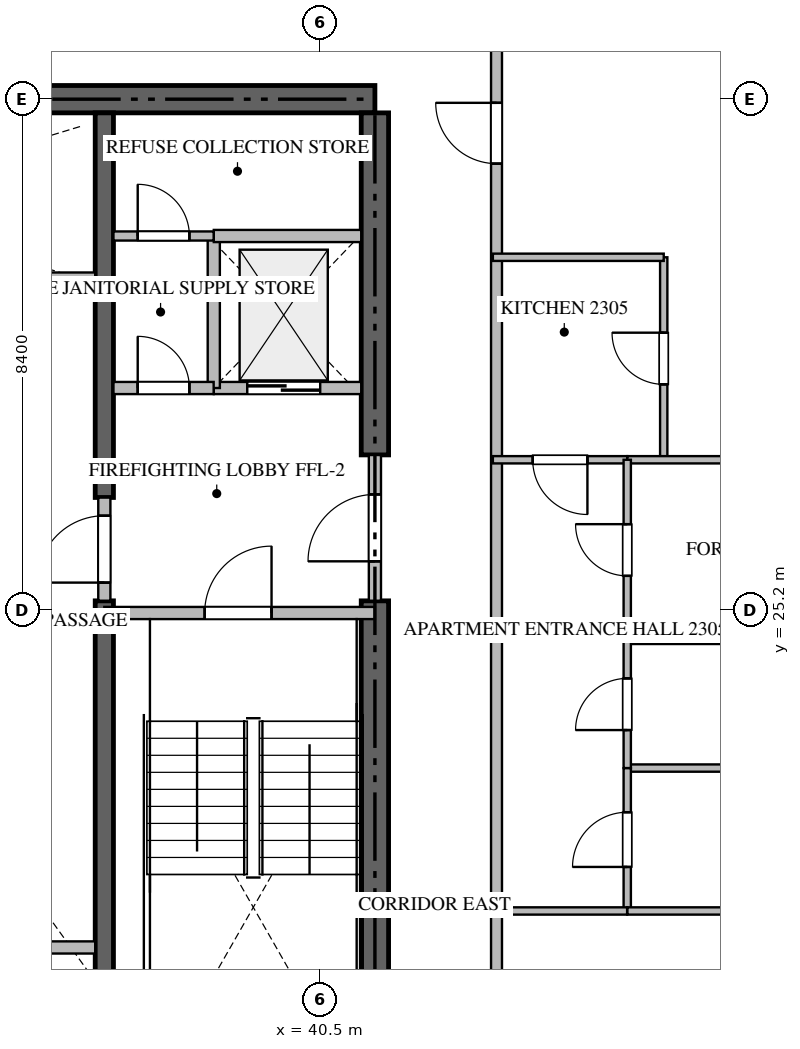
"""IFC4 building model, lengths in metres.
Left out: names, types, materials, properties, quantities, classifications, styles, units other than length and angle.
Written with IfcOpenShell. Run it as: python <this file> out.ifc"""

import sys

from ifc_helpers import new_model, si_unit, direction, frame, frame_2d, origin, place, context, subcontext, project, spatial, rectangle, extrude, source, transform, mapped, element, fill, save


model = new_model("IFC4")
c1 = context("Model", 3, precision=1e-05, world=origin(), true_north=direction((0.0, 1.0)))
c2 = subcontext(c1, "Body", "Model", "MODEL_VIEW")
j1 = project(units=[si_unit("LENGTHUNIT", "METRE"), si_unit("PLANEANGLEUNIT", "RADIAN")], contexts=[c1])
p1 = place(None, origin())
s1 = spatial("IfcSite", under=j1, at=p1, CompositionType="ELEMENT")
p2 = place(p1, origin())
s2 = spatial("IfcBuilding", under=s1, at=p2, CompositionType="ELEMENT")
p3 = place(p2, frame((0.0, 0.0, 94.2)))
s3 = spatial("IfcBuildingStorey", under=s2, at=p3, CompositionType="ELEMENT", Elevation=94.2)
p4 = place(p3, frame((41.4, 33.6, -0.26), z_axis=(0.0, 0.0, 1.0), x_axis=(-1.0, 0.0, 0.0)))
e1 = element("IfcWall", 1, at=p4, inside=s3, PredefinedType="SHEAR", context=c2, shape_type="SweptSolid", body=[
    extrude(rectangle(XDim=18.0, YDim=0.45, at=frame_2d((9.0, 0.0))), origin(), (0.0, 0.0, 1.0), 3.748),
])
p5 = place(p3, frame((41.4, 17.025, -0.26), z_axis=(0.0, 0.0, 1.0), x_axis=(0.0, 1.0, 0.0)))
e2 = element("IfcWall", 2, at=p5, inside=s3, PredefinedType="SHEAR", context=c2, shape_type="SweptSolid", body=[
    extrude(rectangle(XDim=8.325, YDim=0.45, at=frame_2d((4.163, 0.0))), origin(), (0.0, 0.0, 1.0), 3.748),
])
p6 = place(p3, frame((41.4, 27.75, -0.26), z_axis=(0.0, 0.0, 1.0), x_axis=(0.0, 1.0, 0.0)))
e3 = element("IfcWall", 3, at=p6, inside=s3, PredefinedType="SHEAR", context=c2, shape_type="SweptSolid", body=[
    extrude(rectangle(XDim=5.625, YDim=0.45, at=frame_2d((2.812, 0.0))), origin(), (0.0, 0.0, 1.0), 3.748),
])
p7 = place(p3, frame((36.95, 17.025, -0.26), z_axis=(0.0, 0.0, 1.0), x_axis=(0.0, 1.0, 0.0)))
e4 = element("IfcWall", 4, at=p7, inside=s3, PredefinedType="SHEAR", context=c2, shape_type="SweptSolid", body=[
    extrude(rectangle(XDim=8.325, YDim=0.3, at=frame_2d((4.163, 0.0))), origin(), (0.0, 0.0, 1.0), 3.748),
])
p8 = place(p3, frame((36.95, 27.05, -0.26), z_axis=(0.0, 0.0, 1.0), x_axis=(0.0, 1.0, 0.0)))
e5 = element("IfcWall", 5, at=p8, inside=s3, PredefinedType="SHEAR", context=c2, shape_type="SweptSolid", body=[
    extrude(rectangle(XDim=6.325, YDim=0.3, at=frame_2d((3.163, 0.0))), origin(), (0.0, 0.0, 1.0), 3.748),
])
p9 = place(p3, frame((36.95, 25.15, 0.0), z_axis=(0.0, 0.0, 1.0), x_axis=(1.0, 0.0, 0.0)))
e6 = element("IfcWall", 6, at=p9, inside=s3, PredefinedType="STANDARD", context=c2, shape_type="SweptSolid", body=[
    extrude(rectangle(XDim=4.45, YDim=0.2, at=frame_2d((2.225, 0.0))), origin(), (0.0, 0.0, 1.0), 3.49),
])
p10 = place(p9, frame((1.65, 0.0, 0.0)))
e7 = element("IfcOpeningElement", 7, at=p10, cuts=e6, PredefinedType="OPENING", context=c2, shape_type="SweptSolid", body=[
    extrude(rectangle(XDim=1.1, YDim=2.15, at=frame_2d((0.55, 1.075))), frame((0.0, 0.11, 0.0), z_axis=(0.0, -1.0, 0.0), x_axis=(1.0, 0.0, 0.0)), (0.0, 0.0, 1.0), 0.22),
])
p11 = place(p3, frame((38.75, 28.85, 0.0), z_axis=(0.0, 0.0, 1.0), x_axis=(1.0, 0.0, 0.0)))
e8 = element("IfcWall", 8, at=p11, inside=s3, PredefinedType="STANDARD", context=c2, shape_type="SweptSolid", body=[
    extrude(rectangle(XDim=2.425, YDim=0.2, at=frame_2d((1.212, 0.0))), origin(), (0.0, 0.0, 1.0), 3.49),
])
p12 = place(p11, frame((0.55, 0.0, 0.0)))
e9 = element("IfcOpeningElement", 9, at=p12, cuts=e8, PredefinedType="OPENING", context=c2, shape_type="SweptSolid", body=[
    extrude(rectangle(XDim=1.2, YDim=2.2, at=frame_2d((0.6, 1.1))), frame((0.0, 0.11, 0.0), z_axis=(0.0, -1.0, 0.0), x_axis=(1.0, 0.0, 0.0)), (0.0, 0.0, 1.0), 0.22),
])
p13 = place(p3, frame((33.05, 19.65, 0.0), z_axis=(0.0, 0.0, 1.0), x_axis=(1.0, 0.0, 0.0)))
e10 = element("IfcWall", 10, at=p13, inside=s3, PredefinedType="STANDARD", context=c2, shape_type="SweptSolid", body=[
    extrude(rectangle(XDim=3.75, YDim=0.2, at=frame_2d((1.875, 0.0))), origin(), (0.0, 0.0, 1.0), 3.49),
])
p14 = place(p13, frame((0.65, 0.0, 0.0)))
e11 = element("IfcOpeningElement", 11, at=p14, cuts=e10, PredefinedType="OPENING", context=c2, shape_type="SweptSolid", body=[
    extrude(rectangle(XDim=1.1, YDim=2.2, at=frame_2d((0.55, 1.1))), frame((0.0, 0.11, 0.0), z_axis=(0.0, -1.0, 0.0), x_axis=(1.0, 0.0, 0.0)), (0.0, 0.0, 1.0), 0.22),
])
p15 = place(p3, frame((35.0, 30.65, 0.0), z_axis=(0.0, 0.0, 1.0), x_axis=(1.0, 0.0, 0.0)))
e12 = element("IfcWall", 12, at=p15, inside=s3, PredefinedType="STANDARD", context=c2, shape_type="SweptSolid", body=[
    extrude(rectangle(XDim=1.8, YDim=0.2, at=frame_2d((0.9, 0.0))), origin(), (0.0, 0.0, 1.0), 3.49),
])
p16 = place(p3, frame((38.75, 28.85, 0.0), z_axis=(0.0, 0.0, 1.0), x_axis=(0.0, 1.0, 0.0)))
e13 = element("IfcWall", 13, at=p16, inside=s3, PredefinedType="STANDARD", context=c2, shape_type="SweptSolid", body=[
    extrude(rectangle(XDim=2.5, YDim=0.2, at=frame_2d((1.25, 0.0))), origin(), (0.0, 0.0, 1.0), 3.49),
])
p17 = place(p3, frame((38.75, 31.35, 0.0), z_axis=(0.0, 0.0, 1.0), x_axis=(1.0, 0.0, 0.0)))
e14 = element("IfcWall", 14, at=p17, inside=s3, PredefinedType="STANDARD", context=c2, shape_type="SweptSolid", body=[
    extrude(rectangle(XDim=2.425, YDim=0.2, at=frame_2d((1.212, 0.0))), origin(), (0.0, 0.0, 1.0), 3.49),
])
p18 = place(p3, frame((37.1, 28.85, 0.0), z_axis=(0.0, 0.0, 1.0), x_axis=(1.0, 0.0, 0.0)))
e15 = element("IfcWall", 15, at=p18, inside=s3, PredefinedType="STANDARD", context=c2, shape_type="SweptSolid", body=[
    extrude(rectangle(XDim=1.648, YDim=0.2, at=frame_2d((0.824, 0.0))), origin(), (0.0, 0.0, 1.0), 3.49),
])
p19 = place(p18, frame((0.399, 0.0, 0.0)))
e16 = element("IfcOpeningElement", 16, at=p19, cuts=e15, PredefinedType="OPENING", context=c2, shape_type="SweptSolid", body=[
    extrude(rectangle(XDim=0.85, YDim=2.1, at=frame_2d((0.425, 1.05))), frame((0.0, 0.11, 0.0), z_axis=(0.0, -1.0, 0.0), x_axis=(1.0, 0.0, 0.0)), (0.0, 0.0, 1.0), 0.22),
])
p20 = place(p3, frame((41.4, 25.352, 0.0), z_axis=(0.0, 0.0, 1.0), x_axis=(0.0, 1.0, 0.0)))
e17 = element("IfcWall", 17, at=p20, inside=s3, PredefinedType="STANDARD", context=c2, shape_type="SweptSolid", body=[
    extrude(rectangle(XDim=2.396, YDim=0.2, at=frame_2d((1.198, 0.0))), origin(), (0.0, 0.0, 1.0), 3.49),
])
p21 = place(p20, frame((0.648, 0.0, 0.0)))
e18 = element("IfcOpeningElement", 18, at=p21, cuts=e17, PredefinedType="OPENING", context=c2, shape_type="SweptSolid", body=[
    extrude(rectangle(XDim=1.1, YDim=2.15, at=frame_2d((0.55, 1.075))), frame((0.0, 0.11, 0.0), z_axis=(0.0, -1.0, 0.0), x_axis=(1.0, 0.0, 0.0)), (0.0, 0.0, 1.0), 0.22),
])
p22 = place(p3, frame((36.95, 25.352, 0.0), z_axis=(0.0, 0.0, 1.0), x_axis=(0.0, 1.0, 0.0)))
e19 = element("IfcWall", 19, at=p22, inside=s3, PredefinedType="STANDARD", context=c2, shape_type="SweptSolid", body=[
    extrude(rectangle(XDim=1.696, YDim=0.2, at=frame_2d((0.848, 0.0))), origin(), (0.0, 0.0, 1.0), 3.49),
])
p23 = place(p22, frame((0.298, 0.0, 0.0)))
e20 = element("IfcOpeningElement", 20, at=p23, cuts=e19, PredefinedType="OPENING", context=c2, shape_type="SweptSolid", body=[
    extrude(rectangle(XDim=1.1, YDim=2.15, at=frame_2d((0.55, 1.075))), frame((0.0, 0.11, 0.0), z_axis=(0.0, -1.0, 0.0), x_axis=(1.0, 0.0, 0.0)), (0.0, 0.0, 1.0), 0.22),
])
p24 = place(p3, frame((37.1, 31.35, 0.0), z_axis=(0.0, 0.0, 1.0), x_axis=(1.0, 0.0, 0.0)))
e21 = element("IfcWall", 21, at=p24, inside=s3, PredefinedType="PARTITIONING", context=c2, shape_type="SweptSolid", body=[
    extrude(rectangle(XDim=1.648, YDim=0.15, at=frame_2d((0.824, 0.0))), origin(), (0.0, 0.0, 1.0), 3.49),
])
p25 = place(p24, frame((0.399, 0.0, 0.0)))
e22 = element("IfcOpeningElement", 22, at=p25, cuts=e21, PredefinedType="OPENING", context=c2, shape_type="SweptSolid", body=[
    extrude(rectangle(XDim=0.85, YDim=2.1, at=frame_2d((0.425, 1.05))), frame((0.0, 0.085, 0.0), z_axis=(0.0, -1.0, 0.0), x_axis=(1.0, 0.0, 0.0)), (0.0, 0.0, 1.0), 0.17),
])
p26 = place(p3, frame((43.4, 14.9, 0.0), z_axis=(0.0, 0.0, 1.0), x_axis=(0.0, 1.0, 0.0)))
e23 = element("IfcWall", 23, at=p26, inside=s3, PredefinedType="PARTITIONING", context=c2, shape_type="SweptSolid", body=[
    extrude(rectangle(XDim=20.6, YDim=0.18, at=frame_2d((10.3, 0.0))), origin(), (0.0, 0.0, 1.0), 3.49),
])
p27 = place(p26, frame((17.64, 0.0, 0.0)))
e24 = element("IfcOpeningElement", 24, at=p27, cuts=e23, PredefinedType="OPENING", context=c2, shape_type="SweptSolid", body=[
    extrude(rectangle(XDim=1.0, YDim=2.15, at=frame_2d((0.5, 1.075))), frame((0.0, 0.1, 0.0), z_axis=(0.0, -1.0, 0.0), x_axis=(1.0, 0.0, 0.0)), (0.0, 0.0, 1.0), 0.2),
])
p28 = place(p3, frame((46.15, 27.67, 0.0), z_axis=(0.0, 0.0, 1.0), x_axis=(0.0, 1.0, 0.0)))
e25 = element("IfcWall", 25, at=p28, inside=s3, PredefinedType="PARTITIONING", context=c2, shape_type="SweptSolid", body=[
    extrude(rectangle(XDim=3.33, YDim=0.12, at=frame_2d((1.665, 0.0))), origin(), (0.0, 0.0, 1.0), 3.49),
])
p29 = place(p28, frame((1.24, 0.0, 0.0)))
e26 = element("IfcOpeningElement", 26, at=p29, cuts=e25, PredefinedType="OPENING", context=c2, shape_type="SweptSolid", body=[
    extrude(rectangle(XDim=0.85, YDim=2.1, at=frame_2d((0.425, 1.05))), frame((0.0, 0.07, 0.0), z_axis=(0.0, -1.0, 0.0), x_axis=(1.0, 0.0, 0.0)), (0.0, 0.0, 1.0), 0.14),
])
p30 = place(p3, frame((46.15, 31.0, 0.0), z_axis=(0.0, 0.0, 1.0), x_axis=(-1.0, 0.0, 0.0)))
e27 = element("IfcWall", 27, at=p30, inside=s3, PredefinedType="PARTITIONING", context=c2, shape_type="SweptSolid", body=[
    extrude(rectangle(XDim=2.81, YDim=0.12, at=frame_2d((1.405, 0.0))), origin(), (0.0, 0.0, 1.0), 3.49),
])
p31 = place(p3, frame((45.55, 27.67, 0.0), z_axis=(0.0, 0.0, 1.0), x_axis=(-1.0, 0.0, 0.0)))
e28 = element("IfcWall", 28, at=p31, inside=s3, PredefinedType="PARTITIONING", context=c2, shape_type="SweptSolid", body=[
    extrude(rectangle(XDim=2.21, YDim=0.12, at=frame_2d((1.105, 0.0))), origin(), (0.0, 0.0, 1.0), 3.49),
])
p32 = place(p31, frame((0.655, 0.0, 0.0)))
e29 = element("IfcOpeningElement", 29, at=p32, cuts=e28, PredefinedType="OPENING", context=c2, shape_type="SweptSolid", body=[
    extrude(rectangle(XDim=0.9, YDim=2.1, at=frame_2d((0.45, 1.05))), frame((0.0, 0.07, 0.0), z_axis=(0.0, -1.0, 0.0), x_axis=(1.0, 0.0, 0.0)), (0.0, 0.0, 1.0), 0.14),
])
p33 = place(p3, frame((51.739, 27.67, 0.0), z_axis=(0.0, 0.0, 1.0), x_axis=(-1.0, 0.0, 0.0)))
e30 = element("IfcWall", 30, at=p33, inside=s3, PredefinedType="PARTITIONING", context=c2, shape_type="SweptSolid", body=[
    extrude(rectangle(XDim=6.187, YDim=0.12, at=frame_2d((3.094, 0.0))), origin(), (0.0, 0.0, 1.0), 3.49),
])
p34 = place(p3, frame((58.705, 22.6, 0.0), z_axis=(0.0, 0.0, 1.0), x_axis=(-1.0, 0.0, 0.0)))
e31 = element("IfcWall", 31, at=p34, inside=s3, PredefinedType="PARTITIONING", context=c2, shape_type="SweptSolid", body=[
    extrude(rectangle(XDim=13.155, YDim=0.12, at=frame_2d((6.578, 0.0))), origin(), (0.0, 0.0, 1.0), 3.49),
])
p35 = place(p3, frame((51.741, 24.7, 0.0), z_axis=(0.0, 0.0, 1.0), x_axis=(-1.0, 0.0, 0.0)))
e32 = element("IfcWall", 32, at=p35, inside=s3, PredefinedType="PARTITIONING", context=c2, shape_type="SweptSolid", body=[
    extrude(rectangle(XDim=6.191, YDim=0.12, at=frame_2d((3.095, 0.0))), origin(), (0.0, 0.0, 1.0), 3.49),
])
p36 = place(p3, frame((45.55, 22.6, 0.0), z_axis=(0.0, 0.0, 1.0), x_axis=(0.0, 1.0, 0.0)))
e33 = element("IfcWall", 33, at=p36, inside=s3, PredefinedType="PARTITIONING", context=c2, shape_type="SweptSolid", body=[
    extrude(rectangle(XDim=2.1, YDim=0.12, at=frame_2d((1.05, 0.0))), origin(), (0.0, 0.0, 1.0), 3.49),
])
p37 = place(p36, frame((0.625, 0.0, 0.0)))
e34 = element("IfcOpeningElement", 34, at=p37, cuts=e33, PredefinedType="OPENING", context=c2, shape_type="SweptSolid", body=[
    extrude(rectangle(XDim=0.85, YDim=2.1, at=frame_2d((0.425, 1.05))), frame((0.0, 0.07, 0.0), z_axis=(0.0, -1.0, 0.0), x_axis=(1.0, 0.0, 0.0)), (0.0, 0.0, 1.0), 0.14),
])
p38 = place(p3, frame((45.55, 24.702, 0.0), z_axis=(0.0, 0.0, 1.0), x_axis=(0.0, 1.0, 0.0)))
e35 = element("IfcWall", 35, at=p38, inside=s3, PredefinedType="PARTITIONING", context=c2, shape_type="SweptSolid", body=[
    extrude(rectangle(XDim=2.968, YDim=0.12, at=frame_2d((1.484, 0.0))), origin(), (0.0, 0.0, 1.0), 3.49),
])
p39 = place(p38, frame((1.059, 0.0, 0.0)))
e36 = element("IfcOpeningElement", 36, at=p39, cuts=e35, PredefinedType="OPENING", context=c2, shape_type="SweptSolid", body=[
    extrude(rectangle(XDim=0.85, YDim=2.1, at=frame_2d((0.425, 1.05))), frame((0.0, 0.07, 0.0), z_axis=(0.0, -1.0, 0.0), x_axis=(1.0, 0.0, 0.0)), (0.0, 0.0, 1.0), 0.14),
])
p40 = place(p3, frame((45.55, 20.25, 0.0), z_axis=(0.0, 0.0, 1.0), x_axis=(0.0, 1.0, 0.0)))
e37 = element("IfcWall", 37, at=p40, inside=s3, PredefinedType="PARTITIONING", context=c2, shape_type="SweptSolid", body=[
    extrude(rectangle(XDim=2.348, YDim=0.12, at=frame_2d((1.174, 0.0))), origin(), (0.0, 0.0, 1.0), 3.49),
])
p41 = place(p40, frame((0.724, 0.0, 0.0)))
e38 = element("IfcOpeningElement", 38, at=p41, cuts=e37, PredefinedType="OPENING", context=c2, shape_type="SweptSolid", body=[
    extrude(rectangle(XDim=0.9, YDim=2.1, at=frame_2d((0.45, 1.05))), frame((0.0, 0.07, 0.0), z_axis=(0.0, -1.0, 0.0), x_axis=(1.0, 0.0, 0.0)), (0.0, 0.0, 1.0), 0.14),
])
p42 = place(p3, frame((52.131, 20.25, 0.0), z_axis=(0.0, 0.0, 1.0), x_axis=(-1.0, 0.0, 0.0)))
e39 = element("IfcWall", 39, at=p42, inside=s3, PredefinedType="PARTITIONING", context=c2, shape_type="SweptSolid", body=[
    extrude(rectangle(XDim=6.581, YDim=0.12, at=frame_2d((3.291, 0.0))), origin(), (0.0, 0.0, 1.0), 3.49),
])
p43 = place(p42, frame((2.866, 0.0, 0.0)))
e40 = element("IfcOpeningElement", 40, at=p43, cuts=e39, PredefinedType="OPENING", context=c2, shape_type="SweptSolid", body=[
    extrude(rectangle(XDim=0.85, YDim=2.1, at=frame_2d((0.425, 1.05))), frame((0.0, 0.07, 0.0), z_axis=(0.0, -1.0, 0.0), x_axis=(1.0, 0.0, 0.0)), (0.0, 0.0, 1.0), 0.14),
])
p44 = place(p3, frame((45.548, 20.25, 0.0), z_axis=(0.0, 0.0, 1.0), x_axis=(-1.0, 0.0, 0.0)))
e41 = element("IfcWall", 41, at=p44, inside=s3, PredefinedType="PARTITIONING", context=c2, shape_type="SweptSolid", body=[
    extrude(rectangle(XDim=2.208, YDim=0.12, at=frame_2d((1.104, 0.0))), origin(), (0.0, 0.0, 1.0), 3.49),
])
m1 = source(origin(), c2, "Body", "SweptSolid", [
    extrude(rectangle(XDim=1.1, YDim=2.15, at=frame_2d((0.55, 1.075))), frame((0.0, 0.025, 0.0), z_axis=(0.0, -1.0, 0.0), x_axis=(1.0, 0.0, 0.0)), (0.0, 0.0, 1.0), 0.05),
])
p45 = place(p10, origin())
e42 = element("IfcDoor", 42, at=p45, inside=s3, OperationType="SINGLE_SWING_RIGHT", PredefinedType="DOOR", context=c2, shape_type="MappedRepresentation", body=[
    mapped(m1, transform((0.0, 0.0, 0.0), scale=1.0)),
])
fill(e7, e42)
m2 = source(origin(), c2, "Body", "SweptSolid", [
    extrude(rectangle(XDim=1.2, YDim=2.2, at=frame_2d((0.6, 1.1))), frame((0.0, 0.025, 0.0), z_axis=(0.0, -1.0, 0.0), x_axis=(1.0, 0.0, 0.0)), (0.0, 0.0, 1.0), 0.05),
])
p46 = place(p12, origin())
e43 = element("IfcDoor", 43, at=p46, inside=s3, OperationType="DOUBLE_DOOR_SLIDING", PredefinedType="DOOR", context=c2, shape_type="MappedRepresentation", body=[
    mapped(m2, transform((0.0, 0.0, 0.0), scale=1.0)),
])
fill(e9, e43)
m3 = source(origin(), c2, "Body", "SweptSolid", [
    extrude(rectangle(XDim=0.85, YDim=2.1, at=frame_2d((0.425, 1.05))), frame((0.0, 0.025, 0.0), z_axis=(0.0, -1.0, 0.0), x_axis=(1.0, 0.0, 0.0)), (0.0, 0.0, 1.0), 0.05),
])
p47 = place(p19, origin())
e44 = element("IfcDoor", 44, at=p47, inside=s3, OperationType="SINGLE_SWING_LEFT", PredefinedType="DOOR", context=c2, shape_type="MappedRepresentation", body=[
    mapped(m3, transform((0.0, 0.0, 0.0), scale=1.0)),
])
fill(e16, e44)
p48 = place(p21, origin())
e45 = element("IfcDoor", 45, at=p48, inside=s3, OperationType="SINGLE_SWING_LEFT", PredefinedType="DOOR", context=c2, shape_type="MappedRepresentation", body=[
    mapped(m1, transform((0.0, 0.0, 0.0), scale=1.0)),
])
fill(e18, e45)
p49 = place(p23, origin())
e46 = element("IfcDoor", 46, at=p49, inside=s3, OperationType="SINGLE_SWING_LEFT", PredefinedType="DOOR", context=c2, shape_type="MappedRepresentation", body=[
    mapped(m1, transform((0.0, 0.0, 0.0), scale=1.0)),
])
fill(e20, e46)
p50 = place(p25, origin())
e47 = element("IfcDoor", 47, at=p50, inside=s3, OperationType="SINGLE_SWING_LEFT", PredefinedType="DOOR", context=c2, shape_type="MappedRepresentation", body=[
    mapped(m3, transform((0.0, 0.0, 0.0), scale=1.0)),
])
fill(e22, e47)
m4 = source(origin(), c2, "Body", "SweptSolid", [
    extrude(rectangle(XDim=1.0, YDim=2.15, at=frame_2d((0.5, 1.075))), frame((0.0, 0.025, 0.0), z_axis=(0.0, -1.0, 0.0), x_axis=(1.0, 0.0, 0.0)), (0.0, 0.0, 1.0), 0.05),
])
p51 = place(p27, origin())
e48 = element("IfcDoor", 48, at=p51, inside=s3, OperationType="SINGLE_SWING_RIGHT", PredefinedType="DOOR", context=c2, shape_type="MappedRepresentation", body=[
    mapped(m4, transform((0.0, 0.0, 0.0), scale=1.0)),
])
fill(e24, e48)
p52 = place(p29, origin())
e49 = element("IfcDoor", 49, at=p52, inside=s3, OperationType="SINGLE_SWING_RIGHT", PredefinedType="DOOR", context=c2, shape_type="MappedRepresentation", body=[
    mapped(m3, transform((0.0, 0.0, 0.0), scale=1.0)),
])
fill(e26, e49)
m5 = source(origin(), c2, "Body", "SweptSolid", [
    extrude(rectangle(XDim=0.9, YDim=2.1, at=frame_2d((0.45, 1.05))), frame((0.0, 0.025, 0.0), z_axis=(0.0, -1.0, 0.0), x_axis=(1.0, 0.0, 0.0)), (0.0, 0.0, 1.0), 0.05),
])
p53 = place(p32, origin())
e50 = element("IfcDoor", 50, at=p53, inside=s3, OperationType="SINGLE_SWING_LEFT", PredefinedType="DOOR", context=c2, shape_type="MappedRepresentation", body=[
    mapped(m5, transform((0.0, 0.0, 0.0), scale=1.0)),
])
fill(e29, e50)
p54 = place(p37, origin())
e51 = element("IfcDoor", 51, at=p54, inside=s3, OperationType="SINGLE_SWING_LEFT", PredefinedType="DOOR", context=c2, shape_type="MappedRepresentation", body=[
    mapped(m3, transform((0.0, 0.0, 0.0), scale=1.0)),
])
fill(e34, e51)
p55 = place(p39, origin())
e52 = element("IfcDoor", 52, at=p55, inside=s3, OperationType="SINGLE_SWING_RIGHT", PredefinedType="DOOR", context=c2, shape_type="MappedRepresentation", body=[
    mapped(m3, transform((0.0, 0.0, 0.0), scale=1.0)),
])
fill(e36, e52)
p56 = place(p41, origin())
e53 = element("IfcDoor", 53, at=p56, inside=s3, OperationType="SINGLE_SWING_LEFT", PredefinedType="DOOR", context=c2, shape_type="MappedRepresentation", body=[
    mapped(m5, transform((0.0, 0.0, 0.0), scale=1.0)),
])
fill(e38, e53)
save(model, sys.argv[1])
